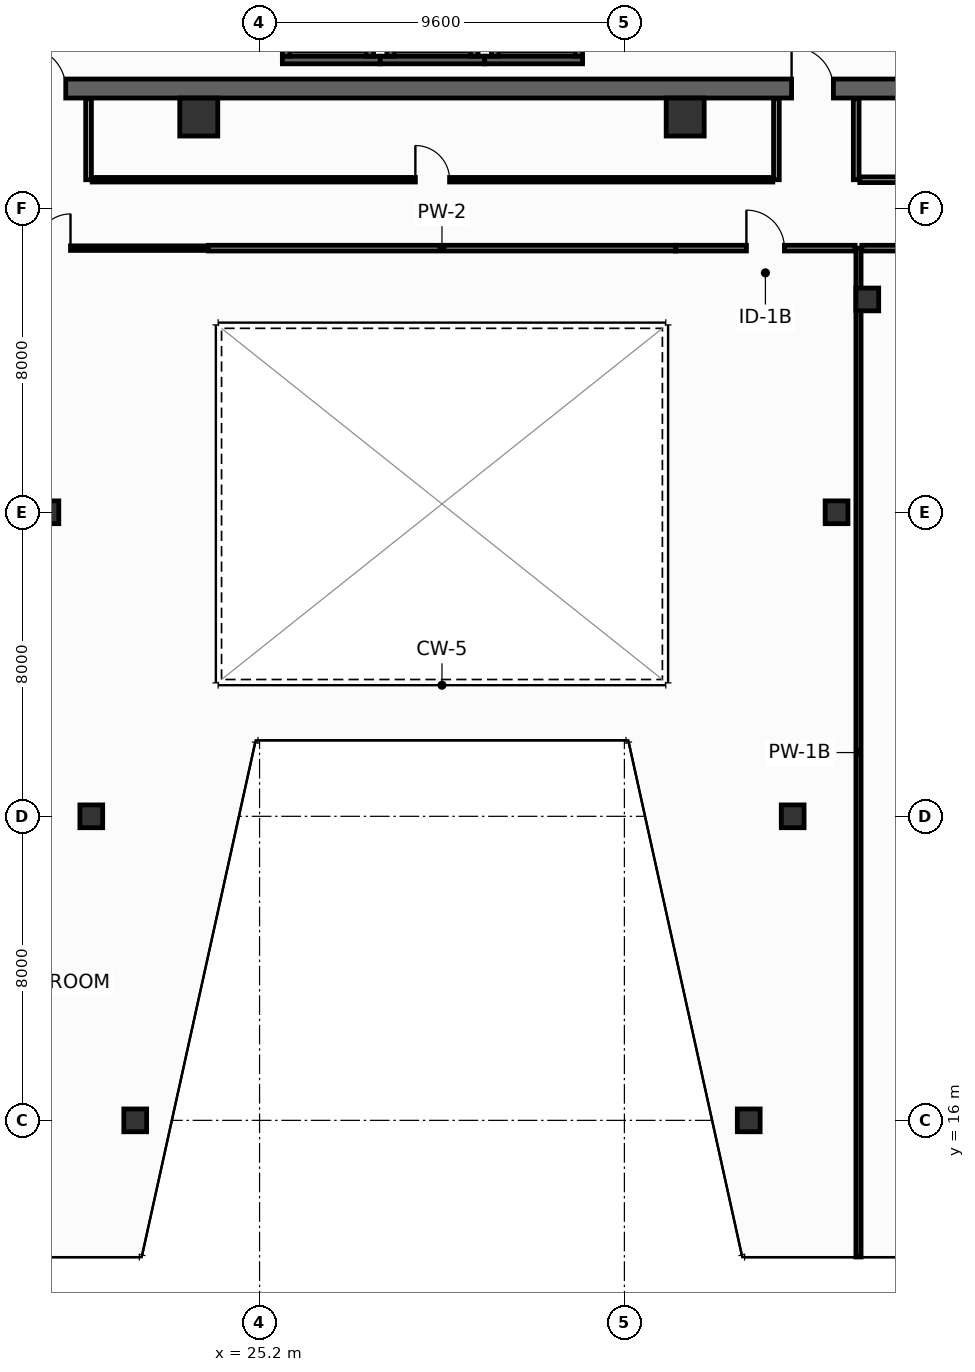
"""IFC4 building model, lengths in metres.
Left out: names, types, materials, properties, quantities, classifications, styles, units other than length and angle.
Written with IfcOpenShell. Run it as: python <this file> out.ifc"""

import sys

from ifc_helpers import new_model, si_unit, direction, frame, frame_2d, origin, origin_2d, place, context, subcontext, project, spatial, rectangle, hollow_rectangle, extrude, element, fill, save


model = new_model("IFC4")
c1 = context("Model", 3, precision=1e-05, world=origin(), true_north=direction((0.0, 1.0)))
c2 = subcontext(c1, "Body", "Model", "MODEL_VIEW")
j1 = project(units=[si_unit("LENGTHUNIT", "METRE"), si_unit("PLANEANGLEUNIT", "RADIAN")], contexts=[c1])
p1 = place(None, origin())
s1 = spatial("IfcSite", under=j1, at=p1, CompositionType="ELEMENT")
p2 = place(p1, origin())
s2 = spatial("IfcBuilding", under=s1, at=p2, CompositionType="ELEMENT")
p3 = place(p2, frame((0.0, 0.0, 175.2)))
s3 = spatial("IfcBuildingStorey", under=s2, at=p3, CompositionType="ELEMENT", Elevation=175.2)
p4 = place(p3, frame((13.6, 43.15, 0.0), z_axis=(0.0, 0.0, 1.0), x_axis=(1.0, 0.0, 0.0)))
e1 = element("IfcWall", 1, at=p4, inside=s3, PredefinedType="SHEAR", context=c2, shape_type="SweptSolid", body=[
    extrude(rectangle(XDim=32.7, YDim=0.5, at=frame_2d((16.35, 0.0))), origin(), (0.0, 0.0, 1.0), 3.55),
])
p5 = place(p4, frame((5.4, 0.0, 0.0)))
e2 = element("IfcOpeningElement", 2, at=p5, cuts=e1, PredefinedType="OPENING", context=c2, shape_type="SweptSolid", body=[
    extrude(rectangle(XDim=1.1, YDim=2.15, at=frame_2d((0.55, 1.075))), frame((0.0, 0.26, 0.0), z_axis=(0.0, -1.0, 0.0), x_axis=(1.0, 0.0, 0.0)), (0.0, 0.0, 1.0), 0.52),
])
p6 = place(p4, frame((25.6, 0.0, 0.0)))
e3 = element("IfcOpeningElement", 3, at=p6, cuts=e1, PredefinedType="OPENING", context=c2, shape_type="SweptSolid", body=[
    extrude(rectangle(XDim=1.1, YDim=2.15, at=frame_2d((0.55, 1.075))), frame((0.0, 0.26, 0.0), z_axis=(0.0, -1.0, 0.0), x_axis=(1.0, 0.0, 0.0)), (0.0, 0.0, 1.0), 0.52),
])
for number, where, z_axis, x_axis in (
    (4, (23.6, 42.4, 0.0), (0.0, 0.0, 1.0), (1.0, 0.0, 0.0)),
    (5, (36.4, 42.4, 0.0), (0.0, 0.0, 1.0), (1.0, 0.0, 0.0)),
):
    element("IfcColumn", number, at=place(p3, frame(where, z_axis=z_axis, x_axis=x_axis)), inside=s3, PredefinedType="COLUMN", context=c2, shape_type="SweptSolid", body=[
        extrude(hollow_rectangle(XDim=1.0, YDim=1.0, WallThickness=0.045, at=origin_2d()), origin(), (0.0, 0.0, 1.0), 3.8),
    ])
for number, where, z_axis, x_axis in (
    (6, (21.928, 16.0, 0.0), (0.0, 0.0, 1.0), (1.0, 0.0, 0.0)),
    (7, (38.072, 16.0, 0.0), (0.0, 0.0, 1.0), (1.0, 0.0, 0.0)),
    (8, (20.772, 24.0, 0.0), (0.0, 0.0, 1.0), (1.0, 0.0, 0.0)),
    (9, (39.228, 24.0, 0.0), (0.0, 0.0, 1.0), (1.0, 0.0, 0.0)),
    (10, (19.617, 32.0, 0.0), (0.0, 0.0, 1.0), (1.0, 0.0, 0.0)),
    (11, (40.383, 32.0, 0.0), (0.0, 0.0, 1.0), (1.0, 0.0, 0.0)),
    (12, (41.192, 37.6, 0.0), (0.0, 0.0, 1.0), (1.0, 0.0, 0.0)),
):
    element("IfcColumn", number, at=place(p3, frame(where, z_axis=z_axis, x_axis=x_axis)), inside=s3, PredefinedType="COLUMN", context=c2, shape_type="SweptSolid", body=[
        extrude(hollow_rectangle(XDim=0.6, YDim=0.6, WallThickness=0.028, at=origin_2d()), origin(), (0.0, 0.0, 1.0), 3.8),
    ])
p7 = place(p3, frame((25.8, 43.9, 0.0), z_axis=(0.0, 0.0, 1.0), x_axis=(1.0, 0.0, 0.0)))
e13 = element("IfcWall", 13, at=p7, inside=s3, PredefinedType="SHEAR", context=c2, shape_type="SweptSolid", body=[
    extrude(rectangle(XDim=2.575, YDim=0.2, at=frame_2d((1.288, 0.0))), origin(), (0.0, 0.0, 1.0), 3.55),
])
for number, where, z_axis, x_axis in (
    (14, (25.9, 44.0, 0.0), (0.0, 0.0, 1.0), (0.0, 1.0, 0.0)),
    (15, (28.1, 44.0, 0.0), (0.0, 0.0, 1.0), (0.0, 1.0, 0.0)),
):
    element("IfcWall", number, at=place(p3, frame(where, z_axis=z_axis, x_axis=x_axis)), inside=s3, PredefinedType="SHEAR", context=c2, shape_type="SweptSolid", body=[
        extrude(rectangle(XDim=2.3, YDim=0.2, at=frame_2d((1.15, 0.0))), origin(), (0.0, 0.0, 1.0), 3.55),
    ])
p8 = place(p3, frame((28.375, 43.9, 0.0), z_axis=(0.0, 0.0, 1.0), x_axis=(1.0, 0.0, 0.0)))
e16 = element("IfcWall", 16, at=p8, inside=s3, PredefinedType="SHEAR", context=c2, shape_type="SweptSolid", body=[
    extrude(rectangle(XDim=2.75, YDim=0.2, at=frame_2d((1.375, 0.0))), origin(), (0.0, 0.0, 1.0), 3.55),
])
for number, where, z_axis, x_axis in (
    (17, (28.65, 44.0, 0.0), (0.0, 0.0, 1.0), (0.0, 1.0, 0.0)),
    (18, (30.85, 44.0, 0.0), (0.0, 0.0, 1.0), (0.0, 1.0, 0.0)),
):
    element("IfcWall", number, at=place(p3, frame(where, z_axis=z_axis, x_axis=x_axis)), inside=s3, PredefinedType="SHEAR", context=c2, shape_type="SweptSolid", body=[
        extrude(rectangle(XDim=2.3, YDim=0.2, at=frame_2d((1.15, 0.0))), origin(), (0.0, 0.0, 1.0), 3.55),
    ])
p9 = place(p3, frame((31.125, 43.9, 0.0), z_axis=(0.0, 0.0, 1.0), x_axis=(1.0, 0.0, 0.0)))
e19 = element("IfcWall", 19, at=p9, inside=s3, PredefinedType="SHEAR", context=c2, shape_type="SweptSolid", body=[
    extrude(rectangle(XDim=2.575, YDim=0.2, at=frame_2d((1.288, 0.0))), origin(), (0.0, 0.0, 1.0), 3.55),
])
for number, where, z_axis, x_axis in (
    (20, (31.4, 44.0, 0.0), (0.0, 0.0, 1.0), (0.0, 1.0, 0.0)),
    (21, (33.6, 44.0, 0.0), (0.0, 0.0, 1.0), (0.0, 1.0, 0.0)),
):
    element("IfcWall", number, at=place(p3, frame(where, z_axis=z_axis, x_axis=x_axis)), inside=s3, PredefinedType="SHEAR", context=c2, shape_type="SweptSolid", body=[
        extrude(rectangle(XDim=2.3, YDim=0.2, at=frame_2d((1.15, 0.0))), origin(), (0.0, 0.0, 1.0), 3.55),
    ])
for number, where, z_axis, x_axis in (
    (22, (20.7, 40.75, 0.0), (0.0, 0.0, 1.0), (0.0, 1.0, 0.0)),
    (23, (38.8, 40.75, 0.0), (0.0, 0.0, 1.0), (0.0, 1.0, 0.0)),
    (24, (40.9, 40.75, 0.0), (0.0, 0.0, 1.0), (0.0, 1.0, 0.0)),
):
    element("IfcWall", number, at=place(p3, frame(where, z_axis=z_axis, x_axis=x_axis)), inside=s3, PredefinedType="PARTITIONING", context=c2, shape_type="SweptSolid", body=[
        extrude(rectangle(XDim=2.13, YDim=0.15, at=frame_2d((1.065, 0.0))), origin(), (0.0, 0.0, 1.0), 3.55),
    ])
p10 = place(p3, frame((20.795, 40.75, 0.0), z_axis=(0.0, 0.0, 1.0), x_axis=(1.0, 0.0, 0.0)))
e25 = element("IfcWall", 25, at=p10, inside=s3, PredefinedType="PARTITIONING", context=c2, shape_type="SweptSolid", body=[
    extrude(rectangle(XDim=17.91, YDim=0.12, at=frame_2d((8.955, 0.0))), origin(), (0.0, 0.0, 1.0), 2.835),
])
p11 = place(p10, frame((8.505, 0.0, 0.0)))
e26 = element("IfcOpeningElement", 26, at=p11, cuts=e25, PredefinedType="OPENING", context=c2, shape_type="SweptSolid", body=[
    extrude(rectangle(XDim=0.9, YDim=2.1, at=frame_2d((0.45, 1.05))), frame((0.0, 0.07, 0.0), z_axis=(0.0, -1.0, 0.0), x_axis=(1.0, 0.0, 0.0)), (0.0, 0.0, 1.0), 0.14),
])
p12 = place(p3, frame((40.995, 40.75, 0.0), z_axis=(0.0, 0.0, 1.0), x_axis=(1.0, 0.0, 0.0)))
e27 = element("IfcWall", 27, at=p12, inside=s3, PredefinedType="PARTITIONING", context=c2, shape_type="SweptSolid", body=[
    extrude(rectangle(XDim=5.155, YDim=0.15, at=frame_2d((2.577, 0.0))), origin(), (0.0, 0.0, 1.0), 3.55),
])
p13 = place(p12, frame((2.078, 0.0, 0.0)))
e28 = element("IfcOpeningElement", 28, at=p13, cuts=e27, PredefinedType="OPENING", context=c2, shape_type="SweptSolid", body=[
    extrude(rectangle(XDim=1.0, YDim=2.15, at=frame_2d((0.5, 1.075))), frame((0.0, 0.085, 0.0), z_axis=(0.0, -1.0, 0.0), x_axis=(1.0, 0.0, 0.0)), (0.0, 0.0, 1.0), 0.17),
])
p14 = place(p3, frame((40.96, 12.405, 0.0), z_axis=(0.0, 0.0, 1.0), x_axis=(0.0, 1.0, 0.0)))
e29 = element("IfcWall", 29, at=p14, inside=s3, PredefinedType="PARTITIONING", context=c2, shape_type="SweptSolid", body=[
    extrude(rectangle(XDim=26.545, YDim=0.135, at=frame_2d((13.272, 0.0))), origin(), (0.0, 0.0, 1.0), 2.835),
])
p15 = place(p3, frame((14.82, 38.95, 0.0), z_axis=(0.0, 0.0, 1.0), x_axis=(1.0, 0.0, 0.0)))
e30 = element("IfcWall", 30, at=p15, inside=s3, PredefinedType="PARTITIONING", context=c2, shape_type="SweptSolid", body=[
    extrude(rectangle(XDim=9.03, YDim=0.12, at=frame_2d((4.515, 0.0))), origin(), (0.0, 0.0, 1.0), 2.835),
])
p16 = place(p15, frame((4.505, 0.0, 0.0)))
e31 = element("IfcOpeningElement", 31, at=p16, cuts=e30, PredefinedType="OPENING", context=c2, shape_type="SweptSolid", body=[
    extrude(rectangle(XDim=0.9, YDim=2.1, at=frame_2d((0.45, 1.05))), frame((0.0, 0.07, 0.0), z_axis=(0.0, -1.0, 0.0), x_axis=(1.0, 0.0, 0.0)), (0.0, 0.0, 1.0), 0.14),
])
p17 = place(p3, frame((23.85, 38.95, 0.0), z_axis=(0.0, 0.0, 1.0), x_axis=(1.0, 0.0, 0.0)))
e32 = element("IfcWall", 32, at=p17, inside=s3, PredefinedType="PARTITIONING", context=c2, shape_type="SweptSolid", body=[
    extrude(rectangle(XDim=12.3, YDim=0.15, at=frame_2d((6.15, 0.0))), origin(), (0.0, 0.0, 1.0), 3.55),
])
p18 = place(p3, frame((36.15, 38.95, 0.0), z_axis=(0.0, 0.0, 1.0), x_axis=(1.0, 0.0, 0.0)))
e33 = element("IfcWall", 33, at=p18, inside=s3, PredefinedType="PARTITIONING", context=c2, shape_type="SweptSolid", body=[
    extrude(rectangle(XDim=4.723, YDim=0.15, at=frame_2d((2.361, 0.0))), origin(), (0.0, 0.0, 1.0), 2.835),
])
p19 = place(p18, frame((1.861, 0.0, 0.0)))
e34 = element("IfcOpeningElement", 34, at=p19, cuts=e33, PredefinedType="OPENING", context=c2, shape_type="SweptSolid", body=[
    extrude(rectangle(XDim=1.0, YDim=2.15, at=frame_2d((0.5, 1.075))), frame((0.0, 0.085, 0.0), z_axis=(0.0, -1.0, 0.0), x_axis=(1.0, 0.0, 0.0)), (0.0, 0.0, 1.0), 0.17),
])
p20 = place(p3, frame((41.048, 38.95, 0.0), z_axis=(0.0, 0.0, 1.0), x_axis=(1.0, 0.0, 0.0)))
e35 = element("IfcWall", 35, at=p20, inside=s3, PredefinedType="PARTITIONING", context=c2, shape_type="SweptSolid", body=[
    extrude(rectangle(XDim=4.125, YDim=0.15, at=frame_2d((2.062, 0.0))), origin(), (0.0, 0.0, 1.0), 3.55),
])
p21 = place(p20, frame((1.538, 0.0, 0.0)))
e36 = element("IfcOpeningElement", 36, at=p21, cuts=e35, PredefinedType="OPENING", context=c2, shape_type="SweptSolid", body=[
    extrude(rectangle(XDim=1.05, YDim=2.15, at=frame_2d((0.525, 1.075))), frame((0.0, 0.085, 0.0), z_axis=(0.0, -1.0, 0.0), x_axis=(1.0, 0.0, 0.0)), (0.0, 0.0, 1.0), 0.17),
])
p22 = place(p5, origin())
e37 = element("IfcDoor", 37, at=p22, inside=s3, OperationType="SINGLE_SWING_LEFT", PredefinedType="DOOR", context=c2, shape_type="SweptSolid", body=[
    extrude(rectangle(XDim=1.1, YDim=2.15, at=frame_2d((0.55, 1.075))), frame((0.0, 0.025, 0.0), z_axis=(0.0, -1.0, 0.0), x_axis=(1.0, 0.0, 0.0)), (0.0, 0.0, 1.0), 0.05),
])
fill(e2, e37)
p23 = place(p6, origin())
e38 = element("IfcDoor", 38, at=p23, inside=s3, OperationType="SINGLE_SWING_LEFT", PredefinedType="DOOR", context=c2, shape_type="SweptSolid", body=[
    extrude(rectangle(XDim=1.1, YDim=2.15, at=frame_2d((0.55, 1.075))), frame((0.0, 0.025, 0.0), z_axis=(0.0, -1.0, 0.0), x_axis=(1.0, 0.0, 0.0)), (0.0, 0.0, 1.0), 0.05),
])
fill(e3, e38)
p24 = place(p11, origin())
e39 = element("IfcDoor", 39, at=p24, inside=s3, OperationType="SINGLE_SWING_LEFT", PredefinedType="DOOR", context=c2, shape_type="SweptSolid", body=[
    extrude(rectangle(XDim=0.9, YDim=2.1, at=frame_2d((0.45, 1.05))), frame((0.0, 0.025, 0.0), z_axis=(0.0, -1.0, 0.0), x_axis=(1.0, 0.0, 0.0)), (0.0, 0.0, 1.0), 0.05),
])
fill(e26, e39)
p25 = place(p16, origin())
e40 = element("IfcDoor", 40, at=p25, inside=s3, OperationType="SINGLE_SWING_RIGHT", PredefinedType="DOOR", context=c2, shape_type="SweptSolid", body=[
    extrude(rectangle(XDim=0.9, YDim=2.1, at=frame_2d((0.45, 1.05))), frame((0.0, 0.025, 0.0), z_axis=(0.0, -1.0, 0.0), x_axis=(1.0, 0.0, 0.0)), (0.0, 0.0, 1.0), 0.05),
])
fill(e31, e40)
p26 = place(p19, origin())
e41 = element("IfcDoor", 41, at=p26, inside=s3, OperationType="SINGLE_SWING_LEFT", PredefinedType="DOOR", context=c2, shape_type="SweptSolid", body=[
    extrude(rectangle(XDim=1.0, YDim=2.15, at=frame_2d((0.5, 1.075))), frame((0.0, 0.025, 0.0), z_axis=(0.0, -1.0, 0.0), x_axis=(1.0, 0.0, 0.0)), (0.0, 0.0, 1.0), 0.05),
])
fill(e34, e41)
save(model, sys.argv[1])
